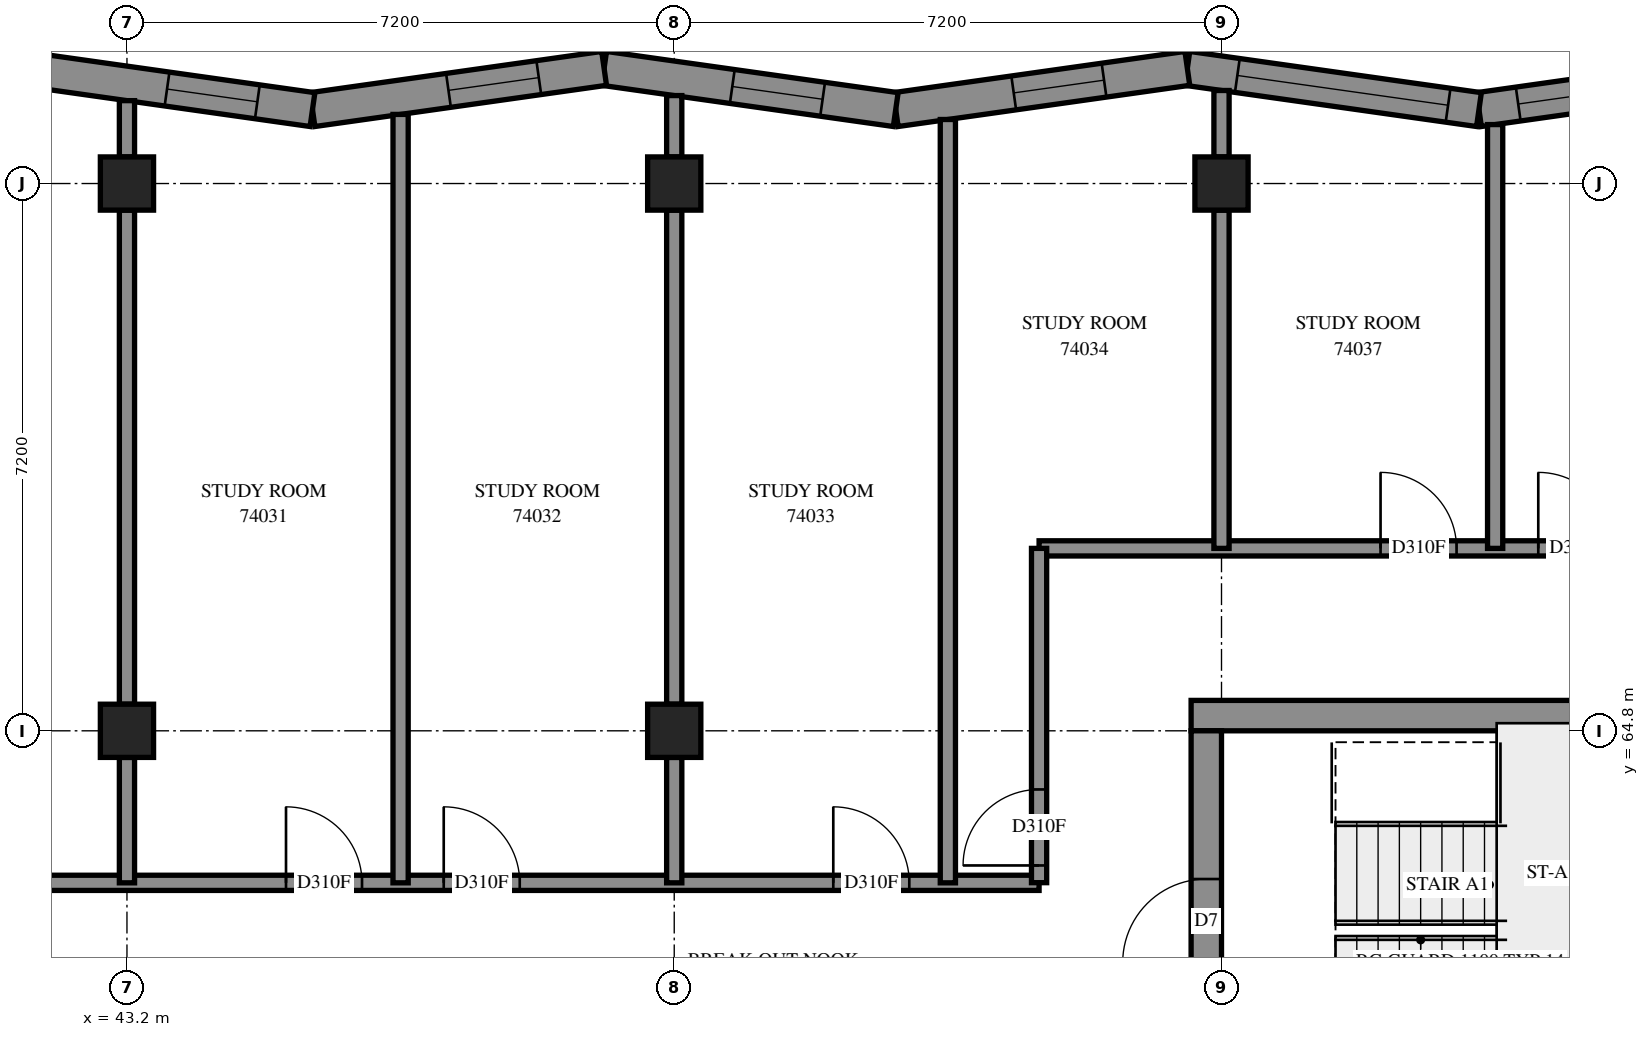
"""IFC4 building model, lengths in metres.
Left out: names, types, materials, properties, quantities, classifications, styles, units other than length and angle.
Written with IfcOpenShell. Run it as: python <this file> out.ifc"""

import sys

from ifc_helpers import new_model, si_unit, direction, frame, frame_2d, origin, origin_2d, place, context, subcontext, project, spatial, polyline, rectangle, outline, extrude, element, fill, save


model = new_model("IFC4")
c1 = context("Model", 3, precision=1e-05, world=origin(), true_north=direction((0.0, 1.0)))
c2 = subcontext(c1, "Body", "Model", "MODEL_VIEW")
j1 = project(units=[si_unit("LENGTHUNIT", "METRE"), si_unit("PLANEANGLEUNIT", "RADIAN")], contexts=[c1])
p1 = place(None, origin())
s1 = spatial("IfcSite", under=j1, at=p1, CompositionType="ELEMENT")
p2 = place(p1, origin())
s2 = spatial("IfcBuilding", under=s1, at=p2, CompositionType="ELEMENT")
p3 = place(p2, frame((0.0, 0.0, 271.0)))
s3 = spatial("IfcBuildingStorey", under=s2, at=p3, CompositionType="ELEMENT", Elevation=271.0)
for number, where, z_axis, x_axis in (
    (1, (43.2, 64.8, 0.0), (0.0, 0.0, 1.0), (1.0, 0.0, 0.0)),
    (2, (43.2, 72.0, 0.0), (0.0, 0.0, 1.0), (1.0, 0.0, 0.0)),
    (3, (50.4, 64.8, 0.0), (0.0, 0.0, 1.0), (1.0, 0.0, 0.0)),
    (4, (50.4, 72.0, 0.0), (0.0, 0.0, 1.0), (1.0, 0.0, 0.0)),
    (5, (57.6, 72.0, 0.0), (0.0, 0.0, 1.0), (1.0, 0.0, 0.0)),
):
    element("IfcColumn", number, at=place(p3, frame(where, z_axis=z_axis, x_axis=x_axis)), inside=s3, PredefinedType="COLUMN", context=c2, shape_type="SweptSolid", body=[
        extrude(rectangle(XDim=0.7, YDim=0.7, at=origin_2d()), origin(), (0.0, 0.0, 1.0), 3.1),
    ])
p4 = place(p3, frame((57.2, 65.0, -0.3), z_axis=(0.0, 0.0, 1.0), x_axis=(1.0, 0.0, 0.0)))
e6 = element("IfcWall", 6, at=p4, inside=s3, PredefinedType="SHEAR", context=c2, shape_type="SweptSolid", body=[
    extrude(rectangle(XDim=15.2, YDim=0.4, at=frame_2d((7.6, 0.0))), origin(), (0.0, 0.0, 1.0), 2.7),
])
p5 = place(p4, frame((10.4, 0.0, 0.3)))
e7 = element("IfcOpeningElement", 7, at=p5, cuts=e6, PredefinedType="OPENING", context=c2, shape_type="SweptSolid", body=[
    extrude(rectangle(XDim=0.8, YDim=2.1, at=frame_2d((0.4, 1.05))), frame((0.0, 0.21, 0.0), z_axis=(0.0, -1.0, 0.0), x_axis=(1.0, 0.0, 0.0)), (0.0, 0.0, 1.0), 0.42),
])
p6 = place(p3, frame((57.4, 50.4, -0.3), z_axis=(0.0, 0.0, 1.0), x_axis=(0.0, 1.0, 0.0)))
e8 = element("IfcWall", 8, at=p6, inside=s3, PredefinedType="SHEAR", context=c2, shape_type="SweptSolid", body=[
    extrude(rectangle(XDim=14.4, YDim=0.4, at=frame_2d((7.2, 0.0))), origin(), (0.0, 0.0, 1.0), 2.7),
])
p7 = place(p6, frame((4.55, 0.0, 0.3)))
e9 = element("IfcOpeningElement", 9, at=p7, cuts=e8, PredefinedType="OPENING", context=c2, shape_type="SweptSolid", body=[
    extrude(rectangle(XDim=1.1, YDim=2.1, at=frame_2d((0.55, 1.05))), frame((0.0, 0.21, 0.0), z_axis=(0.0, -1.0, 0.0), x_axis=(1.0, 0.0, 0.0)), (0.0, 0.0, 1.0), 0.42),
])
p8 = place(p6, frame((11.35, 0.0, 0.3)))
e10 = element("IfcOpeningElement", 10, at=p8, cuts=e8, PredefinedType="OPENING", context=c2, shape_type="SweptSolid", body=[
    extrude(rectangle(XDim=1.1, YDim=2.1, at=frame_2d((0.55, 1.05))), frame((0.0, 0.21, 0.0), z_axis=(0.0, -1.0, 0.0), x_axis=(1.0, 0.0, 0.0)), (0.0, 0.0, 1.0), 0.42),
])
p9 = place(p3, frame((64.824, 73.515, 0.0), z_axis=(0.0, 0.0, 1.0), x_axis=(-0.9901681853, -0.1398819675, 0.0)))
e11 = element("IfcWall", 11, at=p9, inside=s3, PredefinedType="SOLIDWALL", context=c2, shape_type="SweptSolid", body=[
    extrude(outline(polyline([(-0.032, -0.225), (3.843, -0.225), (3.906, 0.225), (0.032, 0.225), (-0.032, -0.225)])), origin(), (0.0, 0.0, 1.0), 3.1),
])
p10 = place(p9, frame((0.553, 0.0, 0.45)))
e12 = element("IfcOpeningElement", 12, at=p10, cuts=e11, PredefinedType="OPENING", context=c2, shape_type="SweptSolid", body=[
    extrude(rectangle(XDim=2.8, YDim=2.55, at=frame_2d((1.4, 1.275))), frame((0.0, 0.235, 0.0), z_axis=(0.0, -1.0, 0.0), x_axis=(1.0, 0.0, 0.0)), (0.0, 0.0, 1.0), 0.47),
])
p11 = place(p3, frame((60.987, 72.973, 0.0), z_axis=(0.0, 0.0, 1.0), x_axis=(-0.9901681853, 0.1398819675, 0.0)))
e13 = element("IfcWall", 13, at=p11, inside=s3, PredefinedType="SOLIDWALL", context=c2, shape_type="SweptSolid", body=[
    extrude(outline(polyline([(0.032, -0.225), (3.906, -0.225), (3.843, 0.225), (-0.032, 0.225), (0.032, -0.225)])), origin(), (0.0, 0.0, 1.0), 3.1),
])
p12 = place(p11, frame((0.41, 0.0, 0.45)))
e14 = element("IfcOpeningElement", 14, at=p12, cuts=e13, PredefinedType="OPENING", context=c2, shape_type="SweptSolid", body=[
    extrude(rectangle(XDim=2.8, YDim=2.55, at=frame_2d((1.4, 1.275))), frame((0.0, 0.235, 0.0), z_axis=(0.0, -1.0, 0.0), x_axis=(1.0, 0.0, 0.0)), (0.0, 0.0, 1.0), 0.47),
])
p13 = place(p3, frame((57.151, 73.515, 0.0), z_axis=(0.0, 0.0, 1.0), x_axis=(-0.9901676803, -0.1398855422, 0.0)))
e15 = element("IfcWall", 15, at=p13, inside=s3, PredefinedType="SOLIDWALL", context=c2, shape_type="SweptSolid", body=[
    extrude(outline(polyline([(-0.032, -0.225), (3.843, -0.225), (3.906, 0.225), (0.032, 0.225), (-0.032, -0.225)])), origin(), (0.0, 0.0, 1.0), 3.1),
])
p14 = place(p13, frame((1.107, 0.0, 0.45)))
e16 = element("IfcOpeningElement", 16, at=p14, cuts=e15, PredefinedType="OPENING", context=c2, shape_type="SweptSolid", body=[
    extrude(rectangle(XDim=1.2, YDim=2.55, at=frame_2d((0.6, 1.275))), frame((0.0, 0.235, 0.0), z_axis=(0.0, -1.0, 0.0), x_axis=(1.0, 0.0, 0.0)), (0.0, 0.0, 1.0), 0.47),
])
p15 = place(p3, frame((53.314, 72.973, 0.0), z_axis=(0.0, 0.0, 1.0), x_axis=(-0.9901681853, 0.1398819675, 0.0)))
e17 = element("IfcWall", 17, at=p15, inside=s3, PredefinedType="SOLIDWALL", context=c2, shape_type="SweptSolid", body=[
    extrude(outline(polyline([(0.032, -0.225), (3.906, -0.225), (3.843, 0.225), (-0.032, 0.225), (0.032, -0.225)])), origin(), (0.0, 0.0, 1.0), 3.1),
])
p16 = place(p15, frame((0.972, 0.0, 0.45)))
e18 = element("IfcOpeningElement", 18, at=p16, cuts=e17, PredefinedType="OPENING", context=c2, shape_type="SweptSolid", body=[
    extrude(rectangle(XDim=1.2, YDim=2.55, at=frame_2d((0.6, 1.275))), frame((0.0, 0.235, 0.0), z_axis=(0.0, -1.0, 0.0), x_axis=(1.0, 0.0, 0.0)), (0.0, 0.0, 1.0), 0.47),
])
p17 = place(p3, frame((49.477, 73.515, 0.0), z_axis=(0.0, 0.0, 1.0), x_axis=(-0.9901681853, -0.1398819675, 0.0)))
e19 = element("IfcWall", 19, at=p17, inside=s3, PredefinedType="SOLIDWALL", context=c2, shape_type="SweptSolid", body=[
    extrude(outline(polyline([(-0.032, -0.225), (3.843, -0.225), (3.906, 0.225), (0.032, 0.225), (-0.032, -0.225)])), origin(), (0.0, 0.0, 1.0), 3.1),
])
p18 = place(p17, frame((0.868, 0.0, 0.45)))
e20 = element("IfcOpeningElement", 20, at=p18, cuts=e19, PredefinedType="OPENING", context=c2, shape_type="SweptSolid", body=[
    extrude(rectangle(XDim=1.2, YDim=2.55, at=frame_2d((0.6, 1.275))), frame((0.0, 0.235, 0.0), z_axis=(0.0, -1.0, 0.0), x_axis=(1.0, 0.0, 0.0)), (0.0, 0.0, 1.0), 0.47),
])
p19 = place(p3, frame((45.641, 72.973, 0.0), z_axis=(0.0, 0.0, 1.0), x_axis=(-0.9901681853, 0.1398819675, 0.0)))
e21 = element("IfcWall", 21, at=p19, inside=s3, PredefinedType="SOLIDWALL", context=c2, shape_type="SweptSolid", body=[
    extrude(outline(polyline([(0.032, -0.225), (3.906, -0.225), (3.843, 0.225), (-0.032, 0.225), (0.032, -0.225)])), origin(), (0.0, 0.0, 1.0), 3.1),
])
p20 = place(p19, frame((0.733, 0.0, 0.45)))
e22 = element("IfcOpeningElement", 22, at=p20, cuts=e21, PredefinedType="OPENING", context=c2, shape_type="SweptSolid", body=[
    extrude(rectangle(XDim=1.2, YDim=2.55, at=frame_2d((0.6, 1.275))), frame((0.0, 0.235, 0.0), z_axis=(0.0, -1.0, 0.0), x_axis=(1.0, 0.0, 0.0)), (0.0, 0.0, 1.0), 0.47),
])
p21 = place(p3, frame((55.2, 67.2, 0.0), z_axis=(0.0, 0.0, 1.0), x_axis=(1.0, 0.0, 0.0)))
e23 = element("IfcWall", 23, at=p21, inside=s3, PredefinedType="PARTITIONING", context=c2, shape_type="SweptSolid", body=[
    extrude(rectangle(XDim=19.2, YDim=0.2, at=frame_2d((9.6, 0.0))), origin(), (0.0, 0.0, 1.0), 3.1),
])
p22 = place(p21, frame((4.492, 0.0, 0.0)))
e24 = element("IfcOpeningElement", 24, at=p22, cuts=e23, PredefinedType="OPENING", context=c2, shape_type="SweptSolid", body=[
    extrude(rectangle(XDim=1.0, YDim=2.1, at=frame_2d((0.5, 1.05))), frame((0.0, 0.11, 0.0), z_axis=(0.0, -1.0, 0.0), x_axis=(1.0, 0.0, 0.0)), (0.0, 0.0, 1.0), 0.22),
])
p23 = place(p21, frame((6.567, 0.0, 0.0)))
e25 = element("IfcOpeningElement", 25, at=p23, cuts=e23, PredefinedType="OPENING", context=c2, shape_type="SweptSolid", body=[
    extrude(rectangle(XDim=1.0, YDim=2.1, at=frame_2d((0.5, 1.05))), frame((0.0, 0.11, 0.0), z_axis=(0.0, -1.0, 0.0), x_axis=(1.0, 0.0, 0.0)), (0.0, 0.0, 1.0), 0.22),
])
p24 = place(p21, frame((11.693, 0.0, 0.0)))
e26 = element("IfcOpeningElement", 26, at=p24, cuts=e23, PredefinedType="OPENING", context=c2, shape_type="SweptSolid", body=[
    extrude(rectangle(XDim=1.0, YDim=2.1, at=frame_2d((0.5, 1.05))), frame((0.0, 0.11, 0.0), z_axis=(0.0, -1.0, 0.0), x_axis=(1.0, 0.0, 0.0)), (0.0, 0.0, 1.0), 0.22),
])
p25 = place(p21, frame((13.88, 0.0, 0.0)))
e27 = element("IfcOpeningElement", 27, at=p25, cuts=e23, PredefinedType="OPENING", context=c2, shape_type="SweptSolid", body=[
    extrude(rectangle(XDim=1.0, YDim=2.1, at=frame_2d((0.5, 1.05))), frame((0.0, 0.11, 0.0), z_axis=(0.0, -1.0, 0.0), x_axis=(1.0, 0.0, 0.0)), (0.0, 0.0, 1.0), 0.22),
])
p26 = place(p3, frame((40.602, 62.8, 0.0), z_axis=(0.0, 0.0, 1.0), x_axis=(1.0, 0.0, 0.0)))
e28 = element("IfcWall", 28, at=p26, inside=s3, PredefinedType="PARTITIONING", context=c2, shape_type="SweptSolid", body=[
    extrude(rectangle(XDim=14.598, YDim=0.2, at=frame_2d((7.299, 0.0))), origin(), (0.0, 0.0, 1.0), 3.1),
])
p27 = place(p26, frame((0.124, 0.0, 0.0)))
e29 = element("IfcOpeningElement", 29, at=p27, cuts=e28, PredefinedType="OPENING", context=c2, shape_type="SweptSolid", body=[
    extrude(rectangle(XDim=1.0, YDim=2.1, at=frame_2d((0.5, 1.05))), frame((0.0, 0.11, 0.0), z_axis=(0.0, -1.0, 0.0), x_axis=(1.0, 0.0, 0.0)), (0.0, 0.0, 1.0), 0.22),
])
p28 = place(p26, frame((4.691, 0.0, 0.0)))
e30 = element("IfcOpeningElement", 30, at=p28, cuts=e28, PredefinedType="OPENING", context=c2, shape_type="SweptSolid", body=[
    extrude(rectangle(XDim=1.0, YDim=2.1, at=frame_2d((0.5, 1.05))), frame((0.0, 0.11, 0.0), z_axis=(0.0, -1.0, 0.0), x_axis=(1.0, 0.0, 0.0)), (0.0, 0.0, 1.0), 0.22),
])
p29 = place(p26, frame((6.766, 0.0, 0.0)))
e31 = element("IfcOpeningElement", 31, at=p29, cuts=e28, PredefinedType="OPENING", context=c2, shape_type="SweptSolid", body=[
    extrude(rectangle(XDim=1.0, YDim=2.1, at=frame_2d((0.5, 1.05))), frame((0.0, 0.11, 0.0), z_axis=(0.0, -1.0, 0.0), x_axis=(1.0, 0.0, 0.0)), (0.0, 0.0, 1.0), 0.22),
])
p30 = place(p26, frame((11.89, 0.0, 0.0)))
e32 = element("IfcOpeningElement", 32, at=p30, cuts=e28, PredefinedType="OPENING", context=c2, shape_type="SweptSolid", body=[
    extrude(rectangle(XDim=1.0, YDim=2.1, at=frame_2d((0.5, 1.05))), frame((0.0, 0.11, 0.0), z_axis=(0.0, -1.0, 0.0), x_axis=(1.0, 0.0, 0.0)), (0.0, 0.0, 1.0), 0.22),
])
p31 = place(p3, frame((46.8, 62.8, 0.0), z_axis=(0.0, 0.0, 1.0), x_axis=(0.0, 1.0, 0.0)))
e33 = element("IfcWall", 33, at=p31, inside=s3, PredefinedType="PARTITIONING", context=c2, shape_type="SweptSolid", body=[
    extrude(rectangle(XDim=10.109, YDim=0.2, at=frame_2d((5.055, 0.0))), origin(), (0.0, 0.0, 1.0), 3.1),
])
p32 = place(p3, frame((54.0, 62.8, 0.0), z_axis=(0.0, 0.0, 1.0), x_axis=(0.0, 1.0, 0.0)))
e34 = element("IfcWall", 34, at=p32, inside=s3, PredefinedType="PARTITIONING", context=c2, shape_type="SweptSolid", body=[
    extrude(rectangle(XDim=10.042, YDim=0.2, at=frame_2d((5.021, 0.0))), origin(), (0.0, 0.0, 1.0), 3.1),
])
for number, where, z_axis, x_axis in (
    (35, (43.2, 65.15, 0.0), (0.0, 0.0, 1.0), (0.0, 1.0, 0.0)),
    (36, (50.4, 65.15, 0.0), (0.0, 0.0, 1.0), (0.0, 1.0, 0.0)),
):
    element("IfcWall", number, at=place(p3, frame(where, z_axis=z_axis, x_axis=x_axis)), inside=s3, PredefinedType="PARTITIONING", context=c2, shape_type="SweptSolid", body=[
        extrude(rectangle(XDim=6.5, YDim=0.2, at=frame_2d((3.25, 0.0))), origin(), (0.0, 0.0, 1.0), 3.1),
    ])
p33 = place(p3, frame((61.2, 67.2, 0.0), z_axis=(0.0, 0.0, 1.0), x_axis=(0.0, 1.0, 0.0)))
e37 = element("IfcWall", 37, at=p33, inside=s3, PredefinedType="PARTITIONING", context=c2, shape_type="SweptSolid", body=[
    extrude(rectangle(XDim=5.576, YDim=0.2, at=frame_2d((2.788, 0.0))), origin(), (0.0, 0.0, 1.0), 3.1),
])
p34 = place(p3, frame((57.6, 67.2, 0.0), z_axis=(0.0, 0.0, 1.0), x_axis=(0.0, 1.0, 0.0)))
e38 = element("IfcWall", 38, at=p34, inside=s3, PredefinedType="PARTITIONING", context=c2, shape_type="SweptSolid", body=[
    extrude(rectangle(XDim=4.45, YDim=0.2, at=frame_2d((2.225, 0.0))), origin(), (0.0, 0.0, 1.0), 3.1),
])
p35 = place(p3, frame((55.2, 62.802, 0.0), z_axis=(0.0, 0.0, 1.0), x_axis=(0.0, 1.0, 0.0)))
e39 = element("IfcWall", 39, at=p35, inside=s3, PredefinedType="PARTITIONING", context=c2, shape_type="SweptSolid", body=[
    extrude(rectangle(XDim=4.398, YDim=0.2, at=frame_2d((2.199, 0.0))), origin(), (0.0, 0.0, 1.0), 3.1),
])
p36 = place(p35, frame((0.227, 0.0, 0.0)))
e40 = element("IfcOpeningElement", 40, at=p36, cuts=e39, PredefinedType="OPENING", context=c2, shape_type="SweptSolid", body=[
    extrude(rectangle(XDim=1.0, YDim=2.1, at=frame_2d((0.5, 1.05))), frame((0.0, 0.11, 0.0), z_axis=(0.0, -1.0, 0.0), x_axis=(1.0, 0.0, 0.0)), (0.0, 0.0, 1.0), 0.22),
])
for number, where, z_axis, x_axis in (
    (41, (43.2, 62.8, 0.0), (0.0, 0.0, 1.0), (0.0, 1.0, 0.0)),
    (42, (50.4, 62.8, 0.0), (0.0, 0.0, 1.0), (0.0, 1.0, 0.0)),
):
    element("IfcWall", number, at=place(p3, frame(where, z_axis=z_axis, x_axis=x_axis)), inside=s3, PredefinedType="PARTITIONING", context=c2, shape_type="SweptSolid", body=[
        extrude(rectangle(XDim=1.65, YDim=0.2, at=frame_2d((0.825, 0.0))), origin(), (0.0, 0.0, 1.0), 3.1),
    ])
p37 = place(p3, frame((57.6, 72.35, 0.0), z_axis=(0.0, 0.0, 1.0), x_axis=(0.0, 1.0, 0.0)))
e43 = element("IfcWall", 43, at=p37, inside=s3, PredefinedType="PARTITIONING", context=c2, shape_type="SweptSolid", body=[
    extrude(rectangle(XDim=0.874, YDim=0.2, at=frame_2d((0.437, 0.0))), origin(), (0.0, 0.0, 1.0), 3.1),
])
p38 = place(p3, frame((50.4, 72.35, 0.0), z_axis=(0.0, 0.0, 1.0), x_axis=(0.0, 1.0, 0.0)))
e44 = element("IfcWall", 44, at=p38, inside=s3, PredefinedType="PARTITIONING", context=c2, shape_type="SweptSolid", body=[
    extrude(rectangle(XDim=0.807, YDim=0.2, at=frame_2d((0.404, 0.0))), origin(), (0.0, 0.0, 1.0), 3.1),
])
p39 = place(p3, frame((43.2, 72.35, 0.0), z_axis=(0.0, 0.0, 1.0), x_axis=(0.0, 1.0, 0.0)))
e45 = element("IfcWall", 45, at=p39, inside=s3, PredefinedType="PARTITIONING", context=c2, shape_type="SweptSolid", body=[
    extrude(rectangle(XDim=0.74, YDim=0.2, at=frame_2d((0.37, 0.0))), origin(), (0.0, 0.0, 1.0), 3.1),
])
p40 = place(p10, origin())
e46 = element("IfcWindow", 46, at=p40, inside=s3, PartitioningType="SINGLE_PANEL", PredefinedType="WINDOW", context=c2, shape_type="SweptSolid", body=[
    extrude(rectangle(XDim=2.8, YDim=2.55, at=frame_2d((1.4, 1.275))), frame((0.0, 0.205, 0.0), z_axis=(0.0, -1.0, 0.0), x_axis=(1.0, 0.0, 0.0)), (0.0, 0.0, 1.0), 0.06),
])
fill(e12, e46)
p41 = place(p12, origin())
e47 = element("IfcWindow", 47, at=p41, inside=s3, PartitioningType="SINGLE_PANEL", PredefinedType="WINDOW", context=c2, shape_type="SweptSolid", body=[
    extrude(rectangle(XDim=2.8, YDim=2.55, at=frame_2d((1.4, 1.275))), frame((0.0, 0.205, 0.0), z_axis=(0.0, -1.0, 0.0), x_axis=(1.0, 0.0, 0.0)), (0.0, 0.0, 1.0), 0.06),
])
fill(e14, e47)
p42 = place(p14, origin())
e48 = element("IfcWindow", 48, at=p42, inside=s3, PartitioningType="SINGLE_PANEL", PredefinedType="WINDOW", context=c2, shape_type="SweptSolid", body=[
    extrude(rectangle(XDim=1.2, YDim=2.55, at=frame_2d((0.6, 1.275))), frame((0.0, 0.205, 0.0), z_axis=(0.0, -1.0, 0.0), x_axis=(1.0, 0.0, 0.0)), (0.0, 0.0, 1.0), 0.06),
])
fill(e16, e48)
p43 = place(p16, origin())
e49 = element("IfcWindow", 49, at=p43, inside=s3, PartitioningType="SINGLE_PANEL", PredefinedType="WINDOW", context=c2, shape_type="SweptSolid", body=[
    extrude(rectangle(XDim=1.2, YDim=2.55, at=frame_2d((0.6, 1.275))), frame((0.0, 0.205, 0.0), z_axis=(0.0, -1.0, 0.0), x_axis=(1.0, 0.0, 0.0)), (0.0, 0.0, 1.0), 0.06),
])
fill(e18, e49)
p44 = place(p18, origin())
e50 = element("IfcWindow", 50, at=p44, inside=s3, PartitioningType="SINGLE_PANEL", PredefinedType="WINDOW", context=c2, shape_type="SweptSolid", body=[
    extrude(rectangle(XDim=1.2, YDim=2.55, at=frame_2d((0.6, 1.275))), frame((0.0, 0.205, 0.0), z_axis=(0.0, -1.0, 0.0), x_axis=(1.0, 0.0, 0.0)), (0.0, 0.0, 1.0), 0.06),
])
fill(e20, e50)
p45 = place(p20, origin())
e51 = element("IfcWindow", 51, at=p45, inside=s3, PartitioningType="SINGLE_PANEL", PredefinedType="WINDOW", context=c2, shape_type="SweptSolid", body=[
    extrude(rectangle(XDim=1.2, YDim=2.55, at=frame_2d((0.6, 1.275))), frame((0.0, 0.205, 0.0), z_axis=(0.0, -1.0, 0.0), x_axis=(1.0, 0.0, 0.0)), (0.0, 0.0, 1.0), 0.06),
])
fill(e22, e51)
p46 = place(p8, origin())
e52 = element("IfcDoor", 52, at=p46, inside=s3, OperationType="SINGLE_SWING_LEFT", PredefinedType="DOOR", context=c2, shape_type="SweptSolid", body=[
    extrude(rectangle(XDim=1.1, YDim=2.1, at=frame_2d((0.55, 1.05))), frame((0.0, 0.025, 0.0), z_axis=(0.0, -1.0, 0.0), x_axis=(1.0, 0.0, 0.0)), (0.0, 0.0, 1.0), 0.05),
])
fill(e10, e52)
p47 = place(p28, origin())
e53 = element("IfcDoor", 53, at=p47, inside=s3, OperationType="SINGLE_SWING_RIGHT", PredefinedType="DOOR", context=c2, shape_type="SweptSolid", body=[
    extrude(rectangle(XDim=1.0, YDim=2.1, at=frame_2d((0.5, 1.05))), frame((0.0, 0.025, 0.0), z_axis=(0.0, -1.0, 0.0), x_axis=(1.0, 0.0, 0.0)), (0.0, 0.0, 1.0), 0.05),
])
fill(e30, e53)
p48 = place(p29, origin())
e54 = element("IfcDoor", 54, at=p48, inside=s3, OperationType="SINGLE_SWING_LEFT", PredefinedType="DOOR", context=c2, shape_type="SweptSolid", body=[
    extrude(rectangle(XDim=1.0, YDim=2.1, at=frame_2d((0.5, 1.05))), frame((0.0, 0.025, 0.0), z_axis=(0.0, -1.0, 0.0), x_axis=(1.0, 0.0, 0.0)), (0.0, 0.0, 1.0), 0.05),
])
fill(e31, e54)
p49 = place(p30, origin())
e55 = element("IfcDoor", 55, at=p49, inside=s3, OperationType="SINGLE_SWING_RIGHT", PredefinedType="DOOR", context=c2, shape_type="SweptSolid", body=[
    extrude(rectangle(XDim=1.0, YDim=2.1, at=frame_2d((0.5, 1.05))), frame((0.0, 0.025, 0.0), z_axis=(0.0, -1.0, 0.0), x_axis=(1.0, 0.0, 0.0)), (0.0, 0.0, 1.0), 0.05),
])
fill(e32, e55)
p50 = place(p36, origin())
e56 = element("IfcDoor", 56, at=p50, inside=s3, OperationType="SINGLE_SWING_LEFT", PredefinedType="DOOR", context=c2, shape_type="SweptSolid", body=[
    extrude(rectangle(XDim=1.0, YDim=2.1, at=frame_2d((0.5, 1.05))), frame((0.0, 0.025, 0.0), z_axis=(0.0, -1.0, 0.0), x_axis=(1.0, 0.0, 0.0)), (0.0, 0.0, 1.0), 0.05),
])
fill(e40, e56)
p51 = place(p22, origin())
e57 = element("IfcDoor", 57, at=p51, inside=s3, OperationType="SINGLE_SWING_RIGHT", PredefinedType="DOOR", context=c2, shape_type="SweptSolid", body=[
    extrude(rectangle(XDim=1.0, YDim=2.1, at=frame_2d((0.5, 1.05))), frame((0.0, 0.025, 0.0), z_axis=(0.0, -1.0, 0.0), x_axis=(1.0, 0.0, 0.0)), (0.0, 0.0, 1.0), 0.05),
])
fill(e24, e57)
p52 = place(p23, origin())
e58 = element("IfcDoor", 58, at=p52, inside=s3, OperationType="SINGLE_SWING_LEFT", PredefinedType="DOOR", context=c2, shape_type="SweptSolid", body=[
    extrude(rectangle(XDim=1.0, YDim=2.1, at=frame_2d((0.5, 1.05))), frame((0.0, 0.025, 0.0), z_axis=(0.0, -1.0, 0.0), x_axis=(1.0, 0.0, 0.0)), (0.0, 0.0, 1.0), 0.05),
])
fill(e25, e58)
save(model, sys.argv[1])
